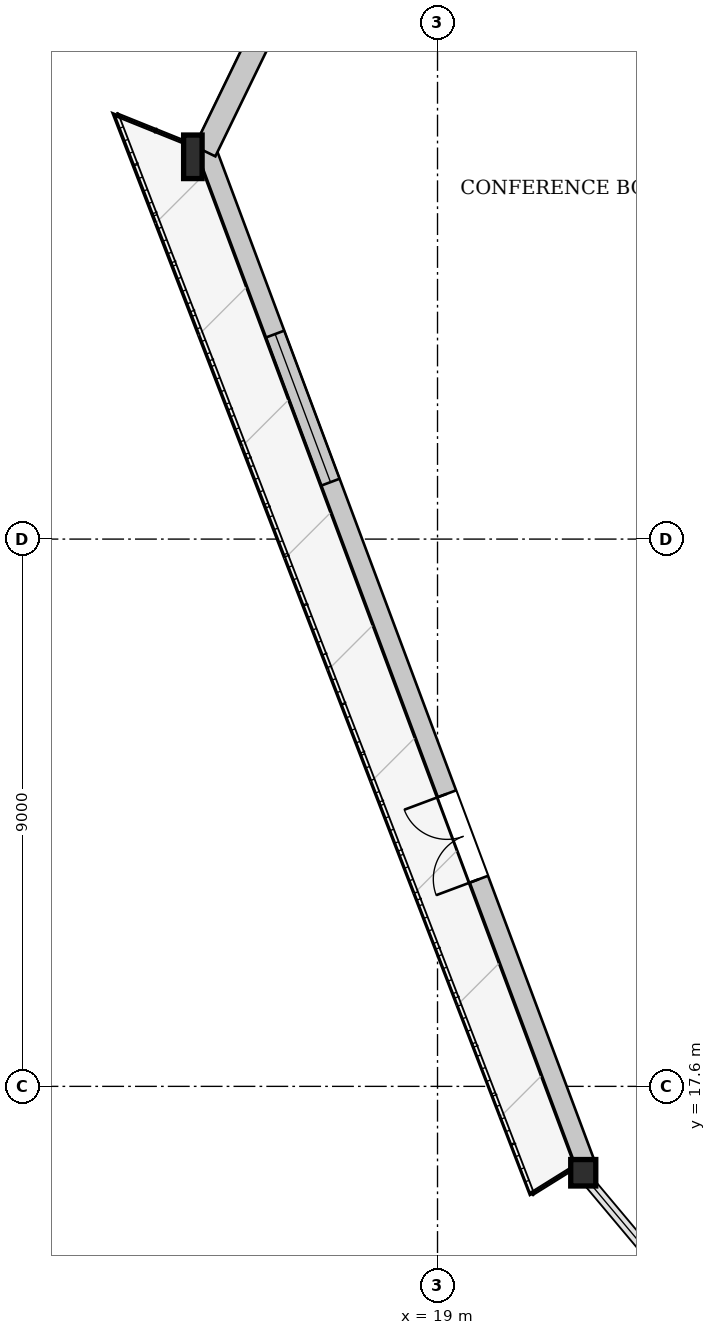
"""IFC4 building model, lengths in metres.
Left out: names, types, materials, properties, quantities, classifications, styles, units other than length and angle.
Written with IfcOpenShell. Run it as: python <this file> out.ifc"""

import sys

from ifc_helpers import new_model, si_unit, direction, frame, frame_2d, origin, origin_2d, place, context, subcontext, project, spatial, rectangle, i_section, extrude, source, transform, mapped, element, fill, save


model = new_model("IFC4")
c1 = context("Model", 3, precision=1e-05, world=origin(), true_north=direction((0.0, 1.0)))
c2 = subcontext(c1, "Body", "Model", "MODEL_VIEW")
j1 = project(units=[si_unit("LENGTHUNIT", "METRE"), si_unit("PLANEANGLEUNIT", "RADIAN")], contexts=[c1])
p1 = place(None, origin())
s1 = spatial("IfcSite", under=j1, at=p1, CompositionType="ELEMENT")
p2 = place(p1, origin())
s2 = spatial("IfcBuilding", under=s1, at=p2, CompositionType="ELEMENT")
p3 = place(p2, frame((0.0, 0.0, 164.35)))
s3 = spatial("IfcBuildingStorey", under=s2, at=p3, CompositionType="ELEMENT", Elevation=164.35)
m1 = source(origin(), c2, "Body", "SweptSolid", [
    extrude(i_section(OverallWidth=0.304, OverallDepth=0.716, WebThickness=0.021, FlangeThickness=0.04, at=origin_2d()), origin(), (0.0, 0.0, 1.0), 3.403),
])
p4 = place(p3, frame((15.004, 33.06, 0.0), z_axis=(-0.016571563289, -0.101940222659, 0.994652489211), x_axis=(0.987043110431, -0.160455283962, 0.0)))
e1 = element("IfcColumn", 1, at=p4, inside=s3, PredefinedType="COLUMN", context=c2, shape_type="MappedRepresentation", body=[
    mapped(m1, transform((0.0, 0.0, 0.0), x_axis=(1.0, 0.0, 0.0), y_axis=(0.0, 1.0, 0.0), z_axis=(0.0, 0.0, 1.0), scale=1.0)),
])
m2 = source(origin(), c2, "Body", "SweptSolid", [
    extrude(i_section(OverallWidth=0.412, OverallDepth=0.435, WebThickness=0.031, FlangeThickness=0.05, at=origin_2d()), origin(), (0.0, 0.0, 1.0), 3.4),
])
p5 = place(p3, frame((21.275, 16.285, 0.0), z_axis=(0.071798002958, -0.062177070562, 0.995479311019), x_axis=(0.654642697098, 0.755938449304, 0.0)))
e2 = element("IfcColumn", 2, at=p5, inside=s3, PredefinedType="COLUMN", context=c2, shape_type="MappedRepresentation", body=[
    mapped(m2, transform((0.0, 0.0, 0.0), x_axis=(1.0, 0.0, 0.0), y_axis=(0.0, 1.0, 0.0), z_axis=(0.0, 0.0, 1.0), scale=1.0)),
])
p6 = place(p3, frame((21.425, 16.341, 0.0), z_axis=(0.0, 0.0, 1.0), x_axis=(-0.350123773093, 0.936703444808, 0.0)))
e3 = element("IfcWall", 3, at=p6, inside=s3, PredefinedType="SOLIDWALL", context=c2, shape_type="SweptSolid", body=[
    extrude(rectangle(XDim=17.909, YDim=0.32, at=frame_2d((8.954, 0.0))), origin(), (0.0, 0.0, 1.0), 2.722),
])
p7 = place(p6, frame((4.981, 0.0, 0.0)))
e4 = element("IfcOpeningElement", 4, at=p7, cuts=e3, PredefinedType="OPENING", context=c2, shape_type="SweptSolid", body=[
    extrude(rectangle(XDim=1.5, YDim=2.3, at=frame_2d((0.75, 1.15))), frame((0.0, 0.17, 0.0), z_axis=(0.0, -1.0, 0.0), x_axis=(1.0, 0.0, 0.0)), (0.0, 0.0, 1.0), 0.34),
])
p8 = place(p6, frame((11.952, 0.0, 0.252)))
e5 = element("IfcOpeningElement", 5, at=p8, cuts=e3, PredefinedType="OPENING", context=c2, shape_type="SweptSolid", body=[
    extrude(rectangle(XDim=2.6, YDim=2.35, at=frame_2d((1.3, 1.175))), frame((0.0, 0.17, 0.0), z_axis=(0.0, -1.0, 0.0), x_axis=(1.0, 0.0, 0.0)), (0.0, 0.0, 1.0), 0.34),
])
p9 = place(p3, frame((15.175, 32.977, 0.0), z_axis=(0.0, 0.0, 1.0), x_axis=(0.436797542264, 0.89955984074, 0.0)))
e6 = element("IfcWall", 6, at=p9, inside=s3, PredefinedType="SOLIDWALL", context=c2, shape_type="SweptSolid", body=[
    extrude(rectangle(XDim=4.72, YDim=0.38, at=frame_2d((2.36, 0.0))), origin(), (0.0, 0.0, 1.0), 2.722),
])
m3 = source(origin(), c2, "Body", "SweptSolid", [
    extrude(rectangle(XDim=1.5, YDim=2.3, at=frame_2d((0.75, 1.15))), frame((0.0, 0.025, 0.0), z_axis=(0.0, -1.0, 0.0), x_axis=(1.0, 0.0, 0.0)), (0.0, 0.0, 1.0), 0.05),
])
p10 = place(p7, origin())
e7 = element("IfcDoor", 7, at=p10, inside=s3, OperationType="DOUBLE_DOOR_SINGLE_SWING", PredefinedType="DOOR", context=c2, shape_type="MappedRepresentation", body=[
    mapped(m3, transform((0.0, 0.0, 0.0), x_axis=(1.0, 0.0, 0.0), y_axis=(0.0, 1.0, 0.0), z_axis=(0.0, 0.0, 1.0), scale=1.0)),
])
fill(e4, e7)
m4 = source(origin(), c2, "Body", "SweptSolid", [
    extrude(rectangle(XDim=2.6, YDim=2.35, at=frame_2d((1.3, 1.175))), frame((0.0, 0.03, 0.0), z_axis=(0.0, -1.0, 0.0), x_axis=(1.0, 0.0, 0.0)), (0.0, 0.0, 1.0), 0.06),
])
p11 = place(p8, origin())
e8 = element("IfcWindow", 8, at=p11, inside=s3, PartitioningType="SINGLE_PANEL", PredefinedType="WINDOW", context=c2, shape_type="MappedRepresentation", body=[
    mapped(m4, transform((0.0, 0.0, 0.0), x_axis=(1.0, 0.0, 0.0), y_axis=(0.0, 1.0, 0.0), z_axis=(0.0, 0.0, 1.0), scale=1.0)),
])
fill(e5, e8)
save(model, sys.argv[1])
